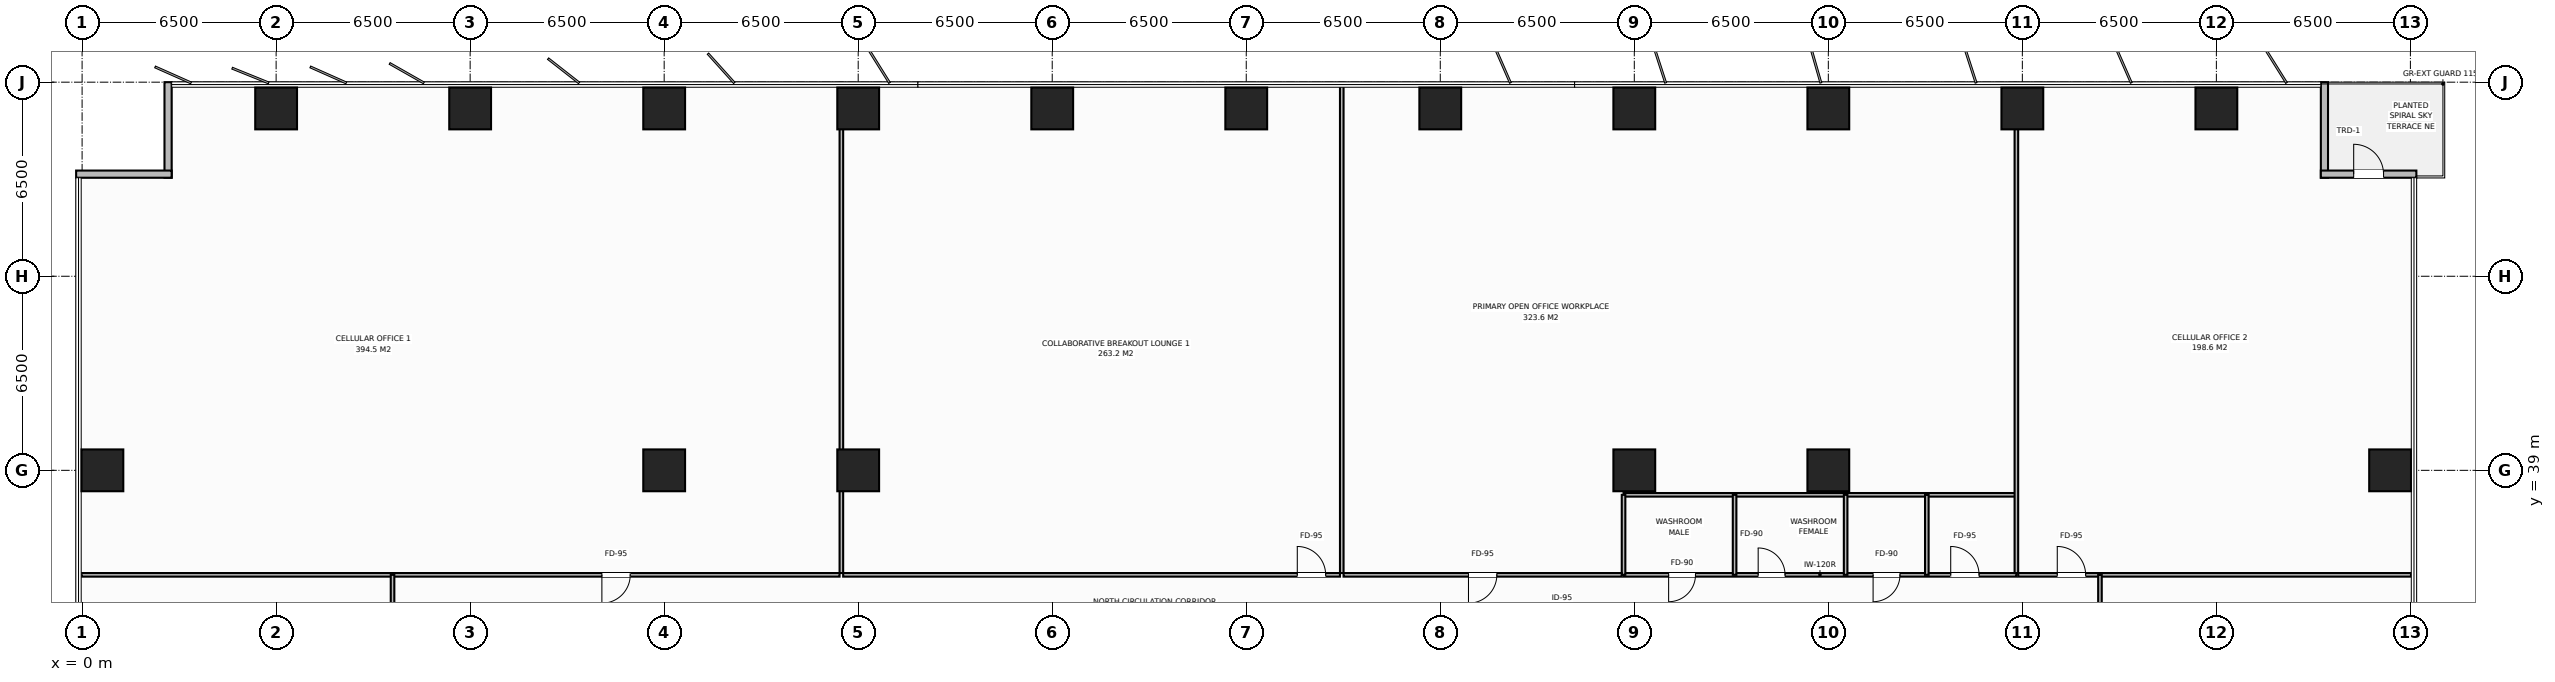
"""IFC4 building model, lengths in metres.
Left out: names, types, materials, properties, quantities, classifications, styles, units other than length and angle.
Written with IfcOpenShell. Run it as: python <this file> out.ifc"""

import sys

from ifc_helpers import new_model, si_unit, direction, frame, frame_2d, origin, origin_2d, place, context, subcontext, project, spatial, rectangle, extrude, element, fill, save


model = new_model("IFC4")
c1 = context("Model", 3, precision=1e-05, world=origin(), true_north=direction((0.0, 1.0)))
c2 = subcontext(c1, "Body", "Model", "MODEL_VIEW")
j1 = project(units=[si_unit("LENGTHUNIT", "METRE"), si_unit("PLANEANGLEUNIT", "RADIAN")], contexts=[c1])
p1 = place(None, origin())
s1 = spatial("IfcSite", under=j1, at=p1, CompositionType="ELEMENT")
p2 = place(p1, origin())
s2 = spatial("IfcBuilding", under=s1, at=p2, CompositionType="ELEMENT")
p3 = place(p2, frame((0.0, 0.0, 58.2)))
s3 = spatial("IfcBuildingStorey", under=s2, at=p3, CompositionType="ELEMENT", Elevation=58.2)
for number, where, z_axis, x_axis in (
    (1, (19.5, 39.0, 0.0), (0.0, 0.0, 1.0), (1.0, 0.0, 0.0)),
    (2, (58.5, 39.0, 0.0), (0.0, 0.0, 1.0), (1.0, 0.0, 0.0)),
    (3, (26.0, 39.0, 0.0), (0.0, 0.0, 1.0), (1.0, 0.0, 0.0)),
    (4, (52.0, 39.0, 0.0), (0.0, 0.0, 1.0), (1.0, 0.0, 0.0)),
    (5, (6.5, 51.12, 0.0), (0.0, 0.0, 1.0), (1.0, 0.0, 0.0)),
    (6, (13.0, 51.12, 0.0), (0.0, 0.0, 1.0), (1.0, 0.0, 0.0)),
    (7, (19.5, 51.12, 0.0), (0.0, 0.0, 1.0), (1.0, 0.0, 0.0)),
    (8, (26.0, 51.12, 0.0), (0.0, 0.0, 1.0), (1.0, 0.0, 0.0)),
    (9, (32.5, 51.12, 0.0), (0.0, 0.0, 1.0), (1.0, 0.0, 0.0)),
    (10, (39.0, 51.12, 0.0), (0.0, 0.0, 1.0), (1.0, 0.0, 0.0)),
    (11, (45.5, 51.12, 0.0), (0.0, 0.0, 1.0), (1.0, 0.0, 0.0)),
    (12, (52.0, 51.12, 0.0), (0.0, 0.0, 1.0), (1.0, 0.0, 0.0)),
    (13, (58.5, 51.12, 0.0), (0.0, 0.0, 1.0), (1.0, 0.0, 0.0)),
    (14, (65.0, 51.12, 0.0), (0.0, 0.0, 1.0), (1.0, 0.0, 0.0)),
    (15, (71.5, 51.12, 0.0), (0.0, 0.0, 1.0), (1.0, 0.0, 0.0)),
    (16, (0.68, 39.0, 0.0), (0.0, 0.0, 1.0), (1.0, 0.0, 0.0)),
    (17, (77.32, 39.0, 0.0), (0.0, 0.0, 1.0), (1.0, 0.0, 0.0)),
):
    element("IfcColumn", number, at=place(p3, frame(where, z_axis=z_axis, x_axis=x_axis)), inside=s3, PredefinedType="COLUMN", context=c2, shape_type="SweptSolid", body=[
        extrude(rectangle(XDim=1.4, YDim=1.4, at=origin_2d()), origin(), (0.0, 0.0, 1.0), 3.8),
    ])
for number, where, z_axis, x_axis in (
    (18, (2.88, 48.8, 0.0), (0.0, 0.0, 1.0), (0.0, 1.0, 0.0)),
    (19, (-0.2, 48.92, 0.0), (0.0, 0.0, 1.0), (1.0, 0.0, 0.0)),
    (20, (75.12, 52.0, 0.0), (0.0, 0.0, 1.0), (0.0, -1.0, 0.0)),
):
    element("IfcWall", number, at=place(p3, frame(where, z_axis=z_axis, x_axis=x_axis)), inside=s3, PredefinedType="STANDARD", context=c2, shape_type="SweptSolid", body=[
        extrude(rectangle(XDim=3.2, YDim=0.24, at=frame_2d((1.6, 0.0))), origin(), (0.0, 0.0, 1.0), 3.55),
    ])
p4 = place(p3, frame((75.0, 48.92, 0.0), z_axis=(0.0, 0.0, 1.0), x_axis=(1.0, 0.0, 0.0)))
e21 = element("IfcWall", 21, at=p4, inside=s3, PredefinedType="STANDARD", context=c2, shape_type="SweptSolid", body=[
    extrude(rectangle(XDim=3.2, YDim=0.24, at=frame_2d((1.6, 0.0))), origin(), (0.0, 0.0, 1.0), 3.55),
])
p5 = place(p4, frame((1.1, 0.0, 0.0)))
e22 = element("IfcOpeningElement", 22, at=p5, cuts=e21, PredefinedType="OPENING", context=c2, shape_type="SweptSolid", body=[
    extrude(rectangle(XDim=1.0, YDim=2.2, at=frame_2d((0.5, 1.1))), frame((0.0, 0.13, 0.0), z_axis=(0.0, -1.0, 0.0), x_axis=(1.0, 0.0, 0.0)), (0.0, 0.0, 1.0), 0.26),
])
p6 = place(p3, frame((51.64, 35.5, 0.0), z_axis=(0.0, 0.0, 1.0), x_axis=(1.0, 0.0, 0.0)))
e23 = element("IfcWall", 23, at=p6, inside=s3, PredefinedType="PARTITIONING", context=c2, shape_type="SweptSolid", body=[
    extrude(rectangle(XDim=13.16, YDim=0.12, at=frame_2d((6.58, 0.0))), origin(), (0.0, 0.0, 1.0), 3.55),
])
p7 = place(p6, frame((1.51, 0.0, 0.0)))
e24 = element("IfcOpeningElement", 24, at=p7, cuts=e23, PredefinedType="OPENING", context=c2, shape_type="SweptSolid", body=[
    extrude(rectangle(XDim=0.9, YDim=2.15, at=frame_2d((0.45, 1.075))), frame((0.0, 0.07, 0.0), z_axis=(0.0, -1.0, 0.0), x_axis=(1.0, 0.0, 0.0)), (0.0, 0.0, 1.0), 0.14),
])
p8 = place(p6, frame((4.51, 0.0, 0.0)))
e25 = element("IfcOpeningElement", 25, at=p8, cuts=e23, PredefinedType="OPENING", context=c2, shape_type="SweptSolid", body=[
    extrude(rectangle(XDim=0.9, YDim=2.15, at=frame_2d((0.45, 1.075))), frame((0.0, 0.07, 0.0), z_axis=(0.0, -1.0, 0.0), x_axis=(1.0, 0.0, 0.0)), (0.0, 0.0, 1.0), 0.14),
])
p9 = place(p6, frame((8.36, 0.0, 0.0)))
e26 = element("IfcOpeningElement", 26, at=p9, cuts=e23, PredefinedType="OPENING", context=c2, shape_type="SweptSolid", body=[
    extrude(rectangle(XDim=0.9, YDim=2.15, at=frame_2d((0.45, 1.075))), frame((0.0, 0.07, 0.0), z_axis=(0.0, -1.0, 0.0), x_axis=(1.0, 0.0, 0.0)), (0.0, 0.0, 1.0), 0.14),
])
p10 = place(p6, frame((10.96, 0.0, 0.0)))
e27 = element("IfcOpeningElement", 27, at=p10, cuts=e23, PredefinedType="OPENING", context=c2, shape_type="SweptSolid", body=[
    extrude(rectangle(XDim=0.95, YDim=2.15, at=frame_2d((0.475, 1.075))), frame((0.0, 0.07, 0.0), z_axis=(0.0, -1.0, 0.0), x_axis=(1.0, 0.0, 0.0)), (0.0, 0.0, 1.0), 0.14),
])
p11 = place(p3, frame((51.64, 38.18, 0.0), z_axis=(0.0, 0.0, 1.0), x_axis=(1.0, 0.0, 0.0)))
e28 = element("IfcWall", 28, at=p11, inside=s3, PredefinedType="PARTITIONING", context=c2, shape_type="SweptSolid", body=[
    extrude(rectangle(XDim=13.16, YDim=0.12, at=frame_2d((6.58, 0.0))), origin(), (0.0, 0.0, 1.0), 3.55),
])
for number, where, z_axis, x_axis in (
    (29, (51.64, 35.5, 0.0), (0.0, 0.0, 1.0), (0.0, 1.0, 0.0)),
    (30, (55.36, 35.5, 0.0), (0.0, 0.0, 1.0), (0.0, 1.0, 0.0)),
    (31, (59.08, 35.5, 0.0), (0.0, 0.0, 1.0), (0.0, 1.0, 0.0)),
    (32, (61.8, 35.5, 0.0), (0.0, 0.0, 1.0), (0.0, 1.0, 0.0)),
):
    element("IfcWall", number, at=place(p3, frame(where, z_axis=z_axis, x_axis=x_axis)), inside=s3, PredefinedType="PARTITIONING", context=c2, shape_type="SweptSolid", body=[
        extrude(rectangle(XDim=2.68, YDim=0.12, at=frame_2d((1.34, 0.0))), origin(), (0.0, 0.0, 1.0), 3.55),
    ])
p12 = place(p3, frame((25.436, 35.56, 0.0), z_axis=(0.0, 0.0, 1.0), x_axis=(0.0, 1.0, 0.0)))
e33 = element("IfcWall", 33, at=p12, inside=s3, PredefinedType="PARTITIONING", context=c2, shape_type="SweptSolid", body=[
    extrude(rectangle(XDim=16.42, YDim=0.12, at=frame_2d((8.21, 0.0))), origin(), (0.0, 0.0, 1.0), 3.55),
])
p13 = place(p3, frame((-0.02, 35.5, 0.0), z_axis=(0.0, 0.0, 1.0), x_axis=(1.0, 0.0, 0.0)))
e34 = element("IfcWall", 34, at=p13, inside=s3, PredefinedType="PARTITIONING", context=c2, shape_type="SweptSolid", body=[
    extrude(rectangle(XDim=25.396, YDim=0.12, at=frame_2d((12.698, 0.0))), origin(), (0.0, 0.0, 1.0), 3.55),
])
p14 = place(p13, frame((17.433, 0.0, 0.0)))
e35 = element("IfcOpeningElement", 35, at=p14, cuts=e34, PredefinedType="OPENING", context=c2, shape_type="SweptSolid", body=[
    extrude(rectangle(XDim=0.95, YDim=2.15, at=frame_2d((0.475, 1.075))), frame((0.0, 0.07, 0.0), z_axis=(0.0, -1.0, 0.0), x_axis=(1.0, 0.0, 0.0)), (0.0, 0.0, 1.0), 0.14),
])
p15 = place(p3, frame((42.2, 35.56, 0.0), z_axis=(0.0, 0.0, 1.0), x_axis=(0.0, 1.0, 0.0)))
e36 = element("IfcWall", 36, at=p15, inside=s3, PredefinedType="PARTITIONING", context=c2, shape_type="SweptSolid", body=[
    extrude(rectangle(XDim=16.42, YDim=0.12, at=frame_2d((8.21, 0.0))), origin(), (0.0, 0.0, 1.0), 3.55),
])
p16 = place(p3, frame((25.496, 35.5, 0.0), z_axis=(0.0, 0.0, 1.0), x_axis=(1.0, 0.0, 0.0)))
e37 = element("IfcWall", 37, at=p16, inside=s3, PredefinedType="PARTITIONING", context=c2, shape_type="SweptSolid", body=[
    extrude(rectangle(XDim=16.644, YDim=0.12, at=frame_2d((8.322, 0.0))), origin(), (0.0, 0.0, 1.0), 3.55),
])
p17 = place(p16, frame((15.214, 0.0, 0.0)))
e38 = element("IfcOpeningElement", 38, at=p17, cuts=e37, PredefinedType="OPENING", context=c2, shape_type="SweptSolid", body=[
    extrude(rectangle(XDim=0.95, YDim=2.15, at=frame_2d((0.475, 1.075))), frame((0.0, 0.07, 0.0), z_axis=(0.0, -1.0, 0.0), x_axis=(1.0, 0.0, 0.0)), (0.0, 0.0, 1.0), 0.14),
])
p18 = place(p3, frame((64.8, 35.56, 0.0), z_axis=(0.0, 0.0, 1.0), x_axis=(0.0, 1.0, 0.0)))
e39 = element("IfcWall", 39, at=p18, inside=s3, PredefinedType="PARTITIONING", context=c2, shape_type="SweptSolid", body=[
    extrude(rectangle(XDim=16.42, YDim=0.12, at=frame_2d((8.21, 0.0))), origin(), (0.0, 0.0, 1.0), 2.9),
])
p19 = place(p3, frame((42.26, 35.5, 0.0), z_axis=(0.0, 0.0, 1.0), x_axis=(1.0, 0.0, 0.0)))
e40 = element("IfcWall", 40, at=p19, inside=s3, PredefinedType="PARTITIONING", context=c2, shape_type="SweptSolid", body=[
    extrude(rectangle(XDim=9.32, YDim=0.12, at=frame_2d((4.66, 0.0))), origin(), (0.0, 0.0, 1.0), 3.55),
])
p20 = place(p19, frame((4.185, 0.0, 0.0)))
e41 = element("IfcOpeningElement", 41, at=p20, cuts=e40, PredefinedType="OPENING", context=c2, shape_type="SweptSolid", body=[
    extrude(rectangle(XDim=0.95, YDim=2.15, at=frame_2d((0.475, 1.075))), frame((0.0, 0.07, 0.0), z_axis=(0.0, -1.0, 0.0), x_axis=(1.0, 0.0, 0.0)), (0.0, 0.0, 1.0), 0.14),
])
p21 = place(p3, frame((64.86, 35.5, 0.0), z_axis=(0.0, 0.0, 1.0), x_axis=(1.0, 0.0, 0.0)))
e42 = element("IfcWall", 42, at=p21, inside=s3, PredefinedType="PARTITIONING", context=c2, shape_type="SweptSolid", body=[
    extrude(rectangle(XDim=13.16, YDim=0.12, at=frame_2d((6.58, 0.0))), origin(), (0.0, 0.0, 1.0), 3.55),
])
p22 = place(p21, frame((1.31, 0.0, 0.0)))
e43 = element("IfcOpeningElement", 43, at=p22, cuts=e42, PredefinedType="OPENING", context=c2, shape_type="SweptSolid", body=[
    extrude(rectangle(XDim=0.95, YDim=2.15, at=frame_2d((0.475, 1.075))), frame((0.0, 0.07, 0.0), z_axis=(0.0, -1.0, 0.0), x_axis=(1.0, 0.0, 0.0)), (0.0, 0.0, 1.0), 0.14),
])
p23 = place(p3, frame((10.4, 29.167, 0.0), z_axis=(0.0, 0.0, 1.0), x_axis=(0.0, 1.0, 0.0)))
e44 = element("IfcWall", 44, at=p23, inside=s3, PredefinedType="PARTITIONING", context=c2, shape_type="SweptSolid", body=[
    extrude(rectangle(XDim=6.333, YDim=0.12, at=frame_2d((3.167, 0.0))), origin(), (0.0, 0.0, 1.0), 3.55),
])
p24 = place(p23, frame((1.642, 0.0, 0.0)))
e45 = element("IfcOpeningElement", 45, at=p24, cuts=e44, PredefinedType="OPENING", context=c2, shape_type="SweptSolid", body=[
    extrude(rectangle(XDim=0.95, YDim=2.15, at=frame_2d((0.475, 1.075))), frame((0.0, 0.07, 0.0), z_axis=(0.0, -1.0, 0.0), x_axis=(1.0, 0.0, 0.0)), (0.0, 0.0, 1.0), 0.14),
])
p25 = place(p3, frame((67.6, 16.5, 0.0), z_axis=(0.0, 0.0, 1.0), x_axis=(0.0, 1.0, 0.0)))
e46 = element("IfcWall", 46, at=p25, inside=s3, PredefinedType="PARTITIONING", context=c2, shape_type="SweptSolid", body=[
    extrude(rectangle(XDim=19.0, YDim=0.12, at=frame_2d((9.5, 0.0))), origin(), (0.0, 0.0, 1.0), 3.55),
])
p26 = place(p25, frame((9.025, 0.0, 0.0)))
e47 = element("IfcOpeningElement", 47, at=p26, cuts=e46, PredefinedType="OPENING", context=c2, shape_type="SweptSolid", body=[
    extrude(rectangle(XDim=0.95, YDim=2.15, at=frame_2d((0.475, 1.075))), frame((0.0, 0.07, 0.0), z_axis=(0.0, -1.0, 0.0), x_axis=(1.0, 0.0, 0.0)), (0.0, 0.0, 1.0), 0.14),
])
p27 = place(p5, origin())
e48 = element("IfcDoor", 48, at=p27, inside=s3, OperationType="SINGLE_SWING_LEFT", PredefinedType="DOOR", context=c2, shape_type="SweptSolid", body=[
    extrude(rectangle(XDim=1.0, YDim=2.2, at=frame_2d((0.5, 1.1))), frame((0.0, 0.025, 0.0), z_axis=(0.0, -1.0, 0.0), x_axis=(1.0, 0.0, 0.0)), (0.0, 0.0, 1.0), 0.05),
])
fill(e22, e48)
p28 = place(p7, origin())
e49 = element("IfcDoor", 49, at=p28, inside=s3, OperationType="SINGLE_SWING_RIGHT", PredefinedType="DOOR", context=c2, shape_type="SweptSolid", body=[
    extrude(rectangle(XDim=0.9, YDim=2.15, at=frame_2d((0.45, 1.075))), frame((0.0, 0.025, 0.0), z_axis=(0.0, -1.0, 0.0), x_axis=(1.0, 0.0, 0.0)), (0.0, 0.0, 1.0), 0.05),
])
fill(e24, e49)
p29 = place(p8, origin())
e50 = element("IfcDoor", 50, at=p29, inside=s3, OperationType="SINGLE_SWING_LEFT", PredefinedType="DOOR", context=c2, shape_type="SweptSolid", body=[
    extrude(rectangle(XDim=0.9, YDim=2.15, at=frame_2d((0.45, 1.075))), frame((0.0, 0.025, 0.0), z_axis=(0.0, -1.0, 0.0), x_axis=(1.0, 0.0, 0.0)), (0.0, 0.0, 1.0), 0.05),
])
fill(e25, e50)
p30 = place(p9, origin())
e51 = element("IfcDoor", 51, at=p30, inside=s3, OperationType="SINGLE_SWING_RIGHT", PredefinedType="DOOR", context=c2, shape_type="SweptSolid", body=[
    extrude(rectangle(XDim=0.9, YDim=2.15, at=frame_2d((0.45, 1.075))), frame((0.0, 0.025, 0.0), z_axis=(0.0, -1.0, 0.0), x_axis=(1.0, 0.0, 0.0)), (0.0, 0.0, 1.0), 0.05),
])
fill(e26, e51)
p31 = place(p10, origin())
e52 = element("IfcDoor", 52, at=p31, inside=s3, OperationType="SINGLE_SWING_LEFT", PredefinedType="DOOR", context=c2, shape_type="SweptSolid", body=[
    extrude(rectangle(XDim=0.95, YDim=2.15, at=frame_2d((0.475, 1.075))), frame((0.0, 0.025, 0.0), z_axis=(0.0, -1.0, 0.0), x_axis=(1.0, 0.0, 0.0)), (0.0, 0.0, 1.0), 0.05),
])
fill(e27, e52)
p32 = place(p14, origin())
e53 = element("IfcDoor", 53, at=p32, inside=s3, OperationType="SINGLE_SWING_RIGHT", PredefinedType="DOOR", context=c2, shape_type="SweptSolid", body=[
    extrude(rectangle(XDim=0.95, YDim=2.15, at=frame_2d((0.475, 1.075))), frame((0.0, 0.025, 0.0), z_axis=(0.0, -1.0, 0.0), x_axis=(1.0, 0.0, 0.0)), (0.0, 0.0, 1.0), 0.05),
])
fill(e35, e53)
p33 = place(p17, origin())
e54 = element("IfcDoor", 54, at=p33, inside=s3, OperationType="SINGLE_SWING_LEFT", PredefinedType="DOOR", context=c2, shape_type="SweptSolid", body=[
    extrude(rectangle(XDim=0.95, YDim=2.15, at=frame_2d((0.475, 1.075))), frame((0.0, 0.025, 0.0), z_axis=(0.0, -1.0, 0.0), x_axis=(1.0, 0.0, 0.0)), (0.0, 0.0, 1.0), 0.05),
])
fill(e38, e54)
p34 = place(p20, origin())
e55 = element("IfcDoor", 55, at=p34, inside=s3, OperationType="SINGLE_SWING_RIGHT", PredefinedType="DOOR", context=c2, shape_type="SweptSolid", body=[
    extrude(rectangle(XDim=0.95, YDim=2.15, at=frame_2d((0.475, 1.075))), frame((0.0, 0.025, 0.0), z_axis=(0.0, -1.0, 0.0), x_axis=(1.0, 0.0, 0.0)), (0.0, 0.0, 1.0), 0.05),
])
fill(e41, e55)
p35 = place(p22, origin())
e56 = element("IfcDoor", 56, at=p35, inside=s3, OperationType="SINGLE_SWING_LEFT", PredefinedType="DOOR", context=c2, shape_type="SweptSolid", body=[
    extrude(rectangle(XDim=0.95, YDim=2.15, at=frame_2d((0.475, 1.075))), frame((0.0, 0.025, 0.0), z_axis=(0.0, -1.0, 0.0), x_axis=(1.0, 0.0, 0.0)), (0.0, 0.0, 1.0), 0.05),
])
fill(e43, e56)
save(model, sys.argv[1])
